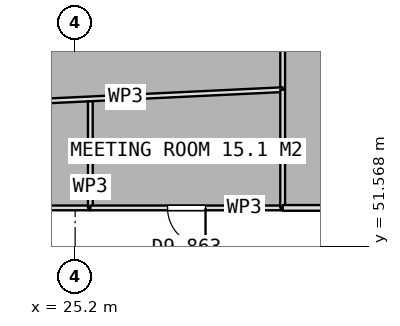
"""IFC4 building model, lengths in metres.
Left out: names, types, materials, properties, quantities, classifications, styles, units other than length and angle.
Written with IfcOpenShell. Run it as: python <this file> out.ifc"""

import sys

from ifc_helpers import new_model, si_unit, direction, frame, frame_2d, origin, place, context, subcontext, project, spatial, rectangle, extrude, element, fill, save


model = new_model("IFC4")
c1 = context("Model", 3, precision=1e-05, world=origin(), true_north=direction((0.0, 1.0)))
c2 = subcontext(c1, "Body", "Model", "MODEL_VIEW")
j1 = project(units=[si_unit("LENGTHUNIT", "METRE"), si_unit("PLANEANGLEUNIT", "RADIAN")], contexts=[c1])
p1 = place(None, origin())
s1 = spatial("IfcSite", under=j1, at=p1, CompositionType="ELEMENT")
p2 = place(p1, origin())
s2 = spatial("IfcBuilding", under=s1, at=p2, CompositionType="ELEMENT")
p3 = place(p2, frame((0.0, 0.0, 213.95)))
s3 = spatial("IfcBuildingStorey", under=s2, at=p3, CompositionType="ELEMENT", Elevation=213.95)
p4 = place(p3, frame((30.661, 61.313, 0.0), z_axis=(0.0, 0.0, 1.0), x_axis=(0.0, -1.0, 0.0)))
e1 = element("IfcWall", 1, at=p4, inside=s3, PredefinedType="PARTITIONING", context=c2, shape_type="SweptSolid", body=[
    extrude(rectangle(XDim=5.627, YDim=0.125, at=frame_2d((2.813, 0.0))), origin(), (0.0, 0.0, 1.0), 3.5),
])
p5 = place(p4, frame((2.314, 0.0, 0.0)))
e2 = element("IfcOpeningElement", 2, at=p5, cuts=e1, PredefinedType="OPENING", context=c2, shape_type="SweptSolid", body=[
    extrude(rectangle(XDim=1.0, YDim=2.1, at=frame_2d((0.5, 1.05))), frame((0.0, 0.073, 0.0), z_axis=(0.0, -1.0, 0.0), x_axis=(1.0, 0.0, 0.0)), (0.0, 0.0, 1.0), 0.145),
])
p6 = place(p3, frame((30.661, 55.686, 0.0), z_axis=(0.0, 0.0, 1.0), x_axis=(-0.998858431805, -0.047768537897, 0.0)))
e3 = element("IfcWall", 3, at=p6, inside=s3, PredefinedType="PARTITIONING", context=c2, shape_type="SweptSolid", body=[
    extrude(rectangle(XDim=8.27, YDim=0.125, at=frame_2d((4.135, 0.0))), origin(), (0.0, 0.0, 1.0), 3.5),
])
p7 = place(p3, frame((25.6, 52.575, 0.0), z_axis=(0.0, 0.0, 1.0), x_axis=(-1.0, 0.0, 0.0)))
e4 = element("IfcWall", 4, at=p7, inside=s3, PredefinedType="PARTITIONING", context=c2, shape_type="SweptSolid", body=[
    extrude(rectangle(XDim=3.2, YDim=0.125, at=frame_2d((1.6, 0.0))), origin(), (0.0, 0.0, 1.0), 3.5),
])
p8 = place(p3, frame((25.6, 55.381, 0.0), z_axis=(0.0, 0.0, 1.0), x_axis=(0.0, -1.0, 0.0)))
e5 = element("IfcWall", 5, at=p8, inside=s3, PredefinedType="PARTITIONING", context=c2, shape_type="SweptSolid", body=[
    extrude(rectangle(XDim=2.806, YDim=0.125, at=frame_2d((1.403, 0.0))), origin(), (0.0, 0.0, 1.0), 3.5),
])
p9 = place(p3, frame((30.661, 52.575, 0.0), z_axis=(0.0, 0.0, 1.0), x_axis=(-1.0, 0.0, 0.0)))
e6 = element("IfcWall", 6, at=p9, inside=s3, PredefinedType="PARTITIONING", context=c2, shape_type="SweptSolid", body=[
    extrude(rectangle(XDim=5.061, YDim=0.125, at=frame_2d((2.53, 0.0))), origin(), (0.0, 0.0, 1.0), 3.5),
])
p10 = place(p9, frame((2.03, 0.0, 0.0)))
e7 = element("IfcOpeningElement", 7, at=p10, cuts=e6, PredefinedType="OPENING", context=c2, shape_type="SweptSolid", body=[
    extrude(rectangle(XDim=1.0, YDim=2.1, at=frame_2d((0.5, 1.05))), frame((0.0, 0.073, 0.0), z_axis=(0.0, -1.0, 0.0), x_axis=(1.0, 0.0, 0.0)), (0.0, 0.0, 1.0), 0.145),
])
p11 = place(p3, frame((30.661, 55.686, 0.0), z_axis=(0.0, 0.0, 1.0), x_axis=(0.0, -1.0, 0.0)))
e8 = element("IfcWall", 8, at=p11, inside=s3, PredefinedType="PARTITIONING", context=c2, shape_type="SweptSolid", body=[
    extrude(rectangle(XDim=3.111, YDim=0.125, at=frame_2d((1.556, 0.0))), origin(), (0.0, 0.0, 1.0), 3.5),
])
p12 = place(p3, frame((53.2, 52.575, 0.0), z_axis=(0.0, 0.0, 1.0), x_axis=(-1.0, 0.0, 0.0)))
e9 = element("IfcWall", 9, at=p12, inside=s3, PredefinedType="PARTITIONING", context=c2, shape_type="SweptSolid", body=[
    extrude(rectangle(XDim=22.539, YDim=0.15, at=frame_2d((11.27, 0.0))), origin(), (0.0, 0.0, 1.0), 3.5),
])
p13 = place(p10, origin())
e10 = element("IfcDoor", 10, at=p13, inside=s3, OperationType="SINGLE_SWING_LEFT", PredefinedType="DOOR", context=c2, shape_type="SweptSolid", body=[
    extrude(rectangle(XDim=1.0, YDim=2.1, at=frame_2d((0.5, 1.05))), frame((0.0, 0.025, 0.0), z_axis=(0.0, -1.0, 0.0), x_axis=(1.0, 0.0, 0.0)), (0.0, 0.0, 1.0), 0.05),
])
fill(e7, e10)
save(model, sys.argv[1])
